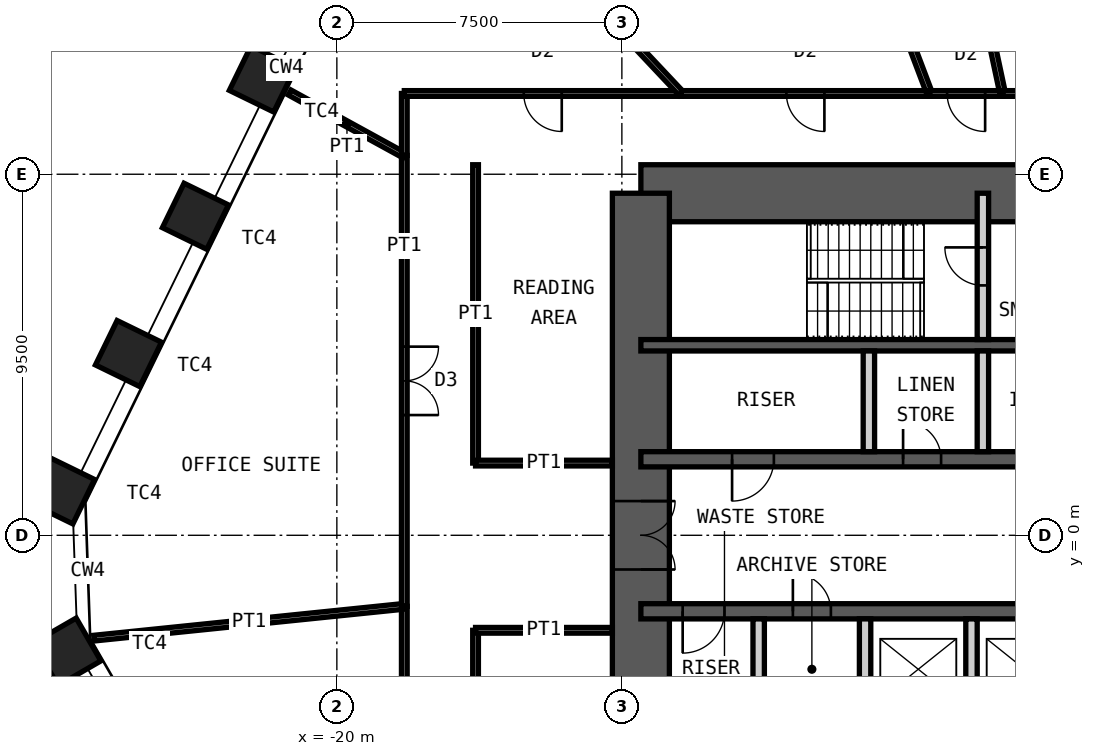
"""IFC4 building model, lengths in metres.
Left out: names, types, materials, properties, quantities, classifications, styles, units other than length and angle.
Written with IfcOpenShell. Run it as: python <this file> out.ifc"""

import sys

from ifc_helpers import new_model, si_unit, direction, frame, frame_2d, origin, origin_2d, place, context, subcontext, project, spatial, rectangle, hollow_rectangle, extrude, element, fill, save


model = new_model("IFC4")
c1 = context("Model", 3, precision=1e-05, world=origin(), true_north=direction((0.0, 1.0)))
c2 = subcontext(c1, "Body", "Model", "MODEL_VIEW")
j1 = project(units=[si_unit("LENGTHUNIT", "METRE"), si_unit("PLANEANGLEUNIT", "RADIAN")], contexts=[c1])
p1 = place(None, origin())
s1 = spatial("IfcSite", under=j1, at=p1, CompositionType="ELEMENT")
p2 = place(p1, origin())
s2 = spatial("IfcBuilding", under=s1, at=p2, CompositionType="ELEMENT")
p3 = place(p2, frame((0.0, 0.0, 145.0)))
s3 = spatial("IfcBuildingStorey", under=s2, at=p3, CompositionType="ELEMENT", Elevation=145.0)
for number, where, z_axis, x_axis in (
    (1, (-27.097, -3.067, 0.0), (0.0, 0.0, 1.0), (0.5, -0.866, 0.0)),
    (2, (-27.245, 1.169, 0.0), (0.0, 0.0, 1.0), (-0.438, -0.899, 0.0)),
    (3, (-25.483, 4.781, 0.0), (0.0, 0.0, 1.0), (-0.438, -0.899, 0.0)),
    (4, (-23.721, 8.394, 0.0), (0.0, 0.0, 1.0), (-0.438, -0.899, 0.0)),
    (5, (-21.959, 12.006, 0.0), (0.0, 0.0, 1.0), (-0.438, -0.899, 0.0)),
):
    element("IfcColumn", number, at=place(p3, frame(where, z_axis=z_axis, x_axis=x_axis)), inside=s3, PredefinedType="COLUMN", context=c2, shape_type="SweptSolid", body=[
        extrude(hollow_rectangle(XDim=1.3, YDim=1.3, WallThickness=0.1, at=origin_2d()), origin(), (0.0, 0.0, 1.0), 4.2),
    ])
p4 = place(p3, frame((-12.0, 9.0, 0.0), z_axis=(0.0, 0.0, 1.0), x_axis=(1.0, 0.0, 0.0)))
e6 = element("IfcWall", 6, at=p4, inside=s3, PredefinedType="SHEAR", context=c2, shape_type="SweptSolid", body=[
    extrude(rectangle(XDim=24.0, YDim=1.5, at=frame_2d((12.0, 0.0))), origin(), (0.0, 0.0, 1.0), 4.2),
])
p5 = place(p4, frame((10.4, 0.0, 0.0)))
e7 = element("IfcOpeningElement", 7, at=p5, cuts=e6, PredefinedType="OPENING", context=c2, shape_type="SweptSolid", body=[
    extrude(rectangle(XDim=1.0, YDim=2.1, at=frame_2d((0.5, 1.05))), frame((0.0, 0.76, 0.0), z_axis=(0.0, -1.0, 0.0), x_axis=(1.0, 0.0, 0.0)), (0.0, 0.0, 1.0), 1.52),
])
p6 = place(p4, frame((17.6, 0.0, 0.0)))
e8 = element("IfcOpeningElement", 8, at=p6, cuts=e6, PredefinedType="OPENING", context=c2, shape_type="SweptSolid", body=[
    extrude(rectangle(XDim=0.9, YDim=2.1, at=frame_2d((0.45, 1.05))), frame((0.0, 0.76, 0.0), z_axis=(0.0, -1.0, 0.0), x_axis=(1.0, 0.0, 0.0)), (0.0, 0.0, 1.0), 1.52),
])
p7 = place(p4, frame((21.9, 0.0, 0.0)))
e9 = element("IfcOpeningElement", 9, at=p7, cuts=e6, PredefinedType="OPENING", context=c2, shape_type="SweptSolid", body=[
    extrude(rectangle(XDim=0.9, YDim=2.1, at=frame_2d((0.45, 1.05))), frame((0.0, 0.76, 0.0), z_axis=(0.0, -1.0, 0.0), x_axis=(1.0, 0.0, 0.0)), (0.0, 0.0, 1.0), 1.52),
])
p8 = place(p3, frame((-12.0, -9.0, 0.0), z_axis=(0.0, 0.0, 1.0), x_axis=(0.0, 1.0, 0.0)))
e10 = element("IfcWall", 10, at=p8, inside=s3, PredefinedType="SHEAR", context=c2, shape_type="SweptSolid", body=[
    extrude(rectangle(XDim=18.0, YDim=1.5, at=frame_2d((9.0, 0.0))), origin(), (0.0, 0.0, 1.0), 4.2),
])
p9 = place(p8, frame((8.1, 0.0, 0.0)))
e11 = element("IfcOpeningElement", 11, at=p9, cuts=e10, PredefinedType="OPENING", context=c2, shape_type="SweptSolid", body=[
    extrude(rectangle(XDim=1.8, YDim=2.1, at=frame_2d((0.9, 1.05))), frame((0.0, 0.76, 0.0), z_axis=(0.0, -1.0, 0.0), x_axis=(1.0, 0.0, 0.0)), (0.0, 0.0, 1.0), 1.52),
])
p10 = place(p3, frame((-12.0, 5.0, 0.0), z_axis=(0.0, 0.0, 1.0), x_axis=(1.0, 0.0, 0.0)))
e12 = element("IfcWall", 12, at=p10, inside=s3, PredefinedType="SHEAR", context=c2, shape_type="SweptSolid", body=[
    extrude(rectangle(XDim=24.0, YDim=0.3, at=frame_2d((12.0, 0.0))), origin(), (0.0, 0.0, 1.0), 4.2),
])
p11 = place(p3, frame((-12.0, 2.0, 0.0), z_axis=(0.0, 0.0, 1.0), x_axis=(1.0, 0.0, 0.0)))
e13 = element("IfcWall", 13, at=p11, inside=s3, PredefinedType="SHEAR", context=c2, shape_type="SweptSolid", body=[
    extrude(rectangle(XDim=24.0, YDim=0.4, at=frame_2d((12.0, 0.0))), origin(), (0.0, 0.0, 1.0), 4.2),
])
p12 = place(p11, frame((2.4, 0.0, 0.0)))
e14 = element("IfcOpeningElement", 14, at=p12, cuts=e13, PredefinedType="OPENING", context=c2, shape_type="SweptSolid", body=[
    extrude(rectangle(XDim=1.1, YDim=2.1, at=frame_2d((0.55, 1.05))), frame((0.0, 0.21, 0.0), z_axis=(0.0, -1.0, 0.0), x_axis=(1.0, 0.0, 0.0)), (0.0, 0.0, 1.0), 0.42),
])
p13 = place(p11, frame((22.0, 0.0, 0.0)))
e15 = element("IfcOpeningElement", 15, at=p13, cuts=e13, PredefinedType="OPENING", context=c2, shape_type="SweptSolid", body=[
    extrude(rectangle(XDim=1.1, YDim=2.1, at=frame_2d((0.55, 1.05))), frame((0.0, 0.21, 0.0), z_axis=(0.0, -1.0, 0.0), x_axis=(1.0, 0.0, 0.0)), (0.0, 0.0, 1.0), 0.42),
])
p14 = place(p11, frame((10.15, 0.0, 0.0)))
e16 = element("IfcOpeningElement", 16, at=p14, cuts=e13, PredefinedType="OPENING", context=c2, shape_type="SweptSolid", body=[
    extrude(rectangle(XDim=1.0, YDim=2.1, at=frame_2d((0.5, 1.05))), frame((0.0, 0.21, 0.0), z_axis=(0.0, -1.0, 0.0), x_axis=(1.0, 0.0, 0.0)), (0.0, 0.0, 1.0), 0.42),
])
p15 = place(p11, frame((6.9, 0.0, 0.0)))
e17 = element("IfcOpeningElement", 17, at=p15, cuts=e13, PredefinedType="OPENING", context=c2, shape_type="SweptSolid", body=[
    extrude(rectangle(XDim=1.0, YDim=2.1, at=frame_2d((0.5, 1.05))), frame((0.0, 0.21, 0.0), z_axis=(0.0, -1.0, 0.0), x_axis=(1.0, 0.0, 0.0)), (0.0, 0.0, 1.0), 0.42),
])
p16 = place(p11, frame((13.35, 0.0, 0.0)))
e18 = element("IfcOpeningElement", 18, at=p16, cuts=e13, PredefinedType="OPENING", context=c2, shape_type="SweptSolid", body=[
    extrude(rectangle(XDim=1.1, YDim=2.4, at=frame_2d((0.55, 1.2))), frame((0.0, 0.21, 0.0), z_axis=(0.0, -1.0, 0.0), x_axis=(1.0, 0.0, 0.0)), (0.0, 0.0, 1.0), 0.42),
])
p17 = place(p11, frame((16.15, 0.0, 0.0)))
e19 = element("IfcOpeningElement", 19, at=p17, cuts=e13, PredefinedType="OPENING", context=c2, shape_type="SweptSolid", body=[
    extrude(rectangle(XDim=1.1, YDim=2.4, at=frame_2d((0.55, 1.2))), frame((0.0, 0.21, 0.0), z_axis=(0.0, -1.0, 0.0), x_axis=(1.0, 0.0, 0.0)), (0.0, 0.0, 1.0), 0.42),
])
p18 = place(p11, frame((18.95, 0.0, 0.0)))
e20 = element("IfcOpeningElement", 20, at=p18, cuts=e13, PredefinedType="OPENING", context=c2, shape_type="SweptSolid", body=[
    extrude(rectangle(XDim=1.1, YDim=2.4, at=frame_2d((0.55, 1.2))), frame((0.0, 0.21, 0.0), z_axis=(0.0, -1.0, 0.0), x_axis=(1.0, 0.0, 0.0)), (0.0, 0.0, 1.0), 0.42),
])
p19 = place(p3, frame((-12.0, -2.0, 0.0), z_axis=(0.0, 0.0, 1.0), x_axis=(1.0, 0.0, 0.0)))
e21 = element("IfcWall", 21, at=p19, inside=s3, PredefinedType="SHEAR", context=c2, shape_type="SweptSolid", body=[
    extrude(rectangle(XDim=24.0, YDim=0.4, at=frame_2d((12.0, 0.0))), origin(), (0.0, 0.0, 1.0), 4.2),
])
p20 = place(p19, frame((1.1, 0.0, 0.0)))
e22 = element("IfcOpeningElement", 22, at=p20, cuts=e21, PredefinedType="OPENING", context=c2, shape_type="SweptSolid", body=[
    extrude(rectangle(XDim=1.1, YDim=2.1, at=frame_2d((0.55, 1.05))), frame((0.0, 0.21, 0.0), z_axis=(0.0, -1.0, 0.0), x_axis=(1.0, 0.0, 0.0)), (0.0, 0.0, 1.0), 0.42),
])
p21 = place(p19, frame((13.55, 0.0, 0.0)))
e23 = element("IfcOpeningElement", 23, at=p21, cuts=e21, PredefinedType="OPENING", context=c2, shape_type="SweptSolid", body=[
    extrude(rectangle(XDim=1.1, YDim=2.1, at=frame_2d((0.55, 1.05))), frame((0.0, 0.21, 0.0), z_axis=(0.0, -1.0, 0.0), x_axis=(1.0, 0.0, 0.0)), (0.0, 0.0, 1.0), 0.42),
])
p22 = place(p19, frame((20.7, 0.0, 0.0)))
e24 = element("IfcOpeningElement", 24, at=p22, cuts=e21, PredefinedType="OPENING", context=c2, shape_type="SweptSolid", body=[
    extrude(rectangle(XDim=1.1, YDim=2.1, at=frame_2d((0.55, 1.05))), frame((0.0, 0.21, 0.0), z_axis=(0.0, -1.0, 0.0), x_axis=(1.0, 0.0, 0.0)), (0.0, 0.0, 1.0), 0.42),
])
p23 = place(p19, frame((4.0, 0.0, 0.0)))
e25 = element("IfcOpeningElement", 25, at=p23, cuts=e21, PredefinedType="OPENING", context=c2, shape_type="SweptSolid", body=[
    extrude(rectangle(XDim=1.0, YDim=2.1, at=frame_2d((0.5, 1.05))), frame((0.0, 0.21, 0.0), z_axis=(0.0, -1.0, 0.0), x_axis=(1.0, 0.0, 0.0)), (0.0, 0.0, 1.0), 0.42),
])
p24 = place(p3, frame((-3.0, 5.15, 0.0), z_axis=(0.0, 0.0, 1.0), x_axis=(0.0, 1.0, 0.0)))
e26 = element("IfcWall", 26, at=p24, inside=s3, PredefinedType="PARTITIONING", context=c2, shape_type="SweptSolid", body=[
    extrude(rectangle(XDim=3.85, YDim=0.3, at=frame_2d((1.925, 0.0))), origin(), (0.0, 0.0, 1.0), 3.98),
])
p25 = place(p24, frame((1.425, 0.0, 0.0)))
e27 = element("IfcOpeningElement", 27, at=p25, cuts=e26, PredefinedType="OPENING", context=c2, shape_type="SweptSolid", body=[
    extrude(rectangle(XDim=1.0, YDim=2.1, at=frame_2d((0.5, 1.05))), frame((0.0, 0.16, 0.0), z_axis=(0.0, -1.0, 0.0), x_axis=(1.0, 0.0, 0.0)), (0.0, 0.0, 1.0), 0.32),
])
for number, where, z_axis, x_axis in (
    (28, (-6.0, 2.2, 0.0), (0.0, 0.0, 1.0), (0.0, 1.0, 0.0)),
    (29, (-3.0, 2.2, 0.0), (0.0, 0.0, 1.0), (0.0, 1.0, 0.0)),
    (30, (-8.9, -4.85, 0.0), (0.0, 0.0, 1.0), (0.0, 1.0, 0.0)),
    (31, (-6.1, -4.85, 0.0), (0.0, 0.0, 1.0), (0.0, 1.0, 0.0)),
    (32, (-3.3, -4.85, 0.0), (0.0, 0.0, 1.0), (0.0, 1.0, 0.0)),
):
    element("IfcWall", number, at=place(p3, frame(where, z_axis=z_axis, x_axis=x_axis)), inside=s3, PredefinedType="PARTITIONING", context=c2, shape_type="SweptSolid", body=[
        extrude(rectangle(XDim=2.65, YDim=0.3, at=frame_2d((1.325, 0.0))), origin(), (0.0, 0.0, 1.0), 3.98),
    ])
p26 = place(p3, frame((-18.225, -11.625, 0.0), z_axis=(0.0, 0.0, 1.0), x_axis=(0.0, 1.0, 0.0)))
e33 = element("IfcWall", 33, at=p26, inside=s3, PredefinedType="PARTITIONING", context=c2, shape_type="SweptSolid", body=[
    extrude(rectangle(XDim=9.756, YDim=0.15, at=frame_2d((4.878, 0.0))), origin(), (0.0, 0.0, 1.0), 4.03),
])
p27 = place(p26, frame((3.978, 0.0, 0.0)))
e34 = element("IfcOpeningElement", 34, at=p27, cuts=e33, PredefinedType="OPENING", context=c2, shape_type="SweptSolid", body=[
    extrude(rectangle(XDim=1.8, YDim=2.4, at=frame_2d((0.9, 1.2))), frame((0.0, 0.085, 0.0), z_axis=(0.0, -1.0, 0.0), x_axis=(1.0, 0.0, 0.0)), (0.0, 0.0, 1.0), 0.17),
])
p28 = place(p3, frame((-26.391, -2.706, 0.0), z_axis=(0.0, 0.0, 1.0), x_axis=(0.994783450774, 0.102009245004, 0.0)))
e35 = element("IfcWall", 35, at=p28, inside=s3, PredefinedType="PARTITIONING", context=c2, shape_type="SweptSolid", body=[
    extrude(rectangle(XDim=8.209, YDim=0.15, at=frame_2d((4.104, 0.0))), origin(), (0.0, 0.0, 1.0), 2.93),
])
p29 = place(p3, frame((-18.225, -1.869, 0.0), z_axis=(0.0, 0.0, 1.0), x_axis=(0.0, 1.0, 0.0)))
e36 = element("IfcWall", 36, at=p29, inside=s3, PredefinedType="PARTITIONING", context=c2, shape_type="SweptSolid", body=[
    extrude(rectangle(XDim=11.865, YDim=0.15, at=frame_2d((5.932, 0.0))), origin(), (0.0, 0.0, 1.0), 4.03),
])
p30 = place(p29, frame((5.032, 0.0, 0.0)))
e37 = element("IfcOpeningElement", 37, at=p30, cuts=e36, PredefinedType="OPENING", context=c2, shape_type="SweptSolid", body=[
    extrude(rectangle(XDim=1.8, YDim=2.4, at=frame_2d((0.9, 1.2))), frame((0.0, 0.085, 0.0), z_axis=(0.0, -1.0, 0.0), x_axis=(1.0, 0.0, 0.0)), (0.0, 0.0, 1.0), 0.17),
])
p31 = place(p3, frame((-21.242, 11.651, 0.0), z_axis=(0.0, 0.0, 1.0), x_axis=(0.876768023831, -0.480913539409, 0.0)))
e38 = element("IfcWall", 38, at=p31, inside=s3, PredefinedType="PARTITIONING", context=c2, shape_type="SweptSolid", body=[
    extrude(rectangle(XDim=3.441, YDim=0.15, at=frame_2d((1.721, 0.0))), origin(), (0.0, 0.0, 1.0), 3.33),
])
p32 = place(p3, frame((-18.225, 9.996, 0.0), z_axis=(0.0, 0.0, 1.0), x_axis=(0.0, 1.0, 0.0)))
e39 = element("IfcWall", 39, at=p32, inside=s3, PredefinedType="PARTITIONING", context=c2, shape_type="SweptSolid", body=[
    extrude(rectangle(XDim=1.629, YDim=0.15, at=frame_2d((0.814, 0.0))), origin(), (0.0, 0.0, 1.0), 4.03),
])
p33 = place(p3, frame((-18.225, 11.625, 0.0), z_axis=(0.0, 0.0, 1.0), x_axis=(1.0, 0.0, 0.0)))
e40 = element("IfcWall", 40, at=p33, inside=s3, PredefinedType="PARTITIONING", context=c2, shape_type="SweptSolid", body=[
    extrude(rectangle(XDim=7.286, YDim=0.15, at=frame_2d((3.643, 0.0))), origin(), (0.0, 0.0, 1.0), 4.03),
])
p34 = place(p33, frame((3.143, 0.0, 0.0)))
e41 = element("IfcOpeningElement", 41, at=p34, cuts=e40, PredefinedType="OPENING", context=c2, shape_type="SweptSolid", body=[
    extrude(rectangle(XDim=1.0, YDim=2.4, at=frame_2d((0.5, 1.2))), frame((0.0, 0.085, 0.0), z_axis=(0.0, -1.0, 0.0), x_axis=(1.0, 0.0, 0.0)), (0.0, 0.0, 1.0), 0.17),
])
p35 = place(p3, frame((-17.738, 18.851, 0.0), z_axis=(0.0, 0.0, 1.0), x_axis=(0.685286406267, -0.728273672039, 0.0)))
e42 = element("IfcWall", 42, at=p35, inside=s3, PredefinedType="PARTITIONING", context=c2, shape_type="SweptSolid", body=[
    extrude(rectangle(XDim=9.922, YDim=0.15, at=frame_2d((4.961, 0.0))), origin(), (0.0, 0.0, 1.0), 3.33),
])
p36 = place(p3, frame((-10.939, 11.625, 0.0), z_axis=(0.0, 0.0, 1.0), x_axis=(1.0, 0.0, 0.0)))
e43 = element("IfcWall", 43, at=p36, inside=s3, PredefinedType="PARTITIONING", context=c2, shape_type="SweptSolid", body=[
    extrude(rectangle(XDim=6.536, YDim=0.15, at=frame_2d((3.268, 0.0))), origin(), (0.0, 0.0, 1.0), 4.03),
])
p37 = place(p36, frame((2.768, 0.0, 0.0)))
e44 = element("IfcOpeningElement", 44, at=p37, cuts=e43, PredefinedType="OPENING", context=c2, shape_type="SweptSolid", body=[
    extrude(rectangle(XDim=1.0, YDim=2.4, at=frame_2d((0.5, 1.2))), frame((0.0, 0.085, 0.0), z_axis=(0.0, -1.0, 0.0), x_axis=(1.0, 0.0, 0.0)), (0.0, 0.0, 1.0), 0.17),
])
p38 = place(p3, frame((-9.167, 24.207, 0.0), z_axis=(0.0, 0.0, 1.0), x_axis=(0.354156368181, -0.935186220427, 0.0)))
e45 = element("IfcWall", 45, at=p38, inside=s3, PredefinedType="PARTITIONING", context=c2, shape_type="SweptSolid", body=[
    extrude(rectangle(XDim=13.454, YDim=0.15, at=frame_2d((6.727, 0.0))), origin(), (0.0, 0.0, 1.0), 3.33),
])
p39 = place(p3, frame((-4.403, 11.625, 0.0), z_axis=(0.0, 0.0, 1.0), x_axis=(1.0, 0.0, 0.0)))
e46 = element("IfcWall", 46, at=p39, inside=s3, PredefinedType="PARTITIONING", context=c2, shape_type="SweptSolid", body=[
    extrude(rectangle(XDim=1.923, YDim=0.15, at=frame_2d((0.961, 0.0))), origin(), (0.0, 0.0, 1.0), 4.03),
])
p40 = place(p39, frame((0.461, 0.0, 0.0)))
e47 = element("IfcOpeningElement", 47, at=p40, cuts=e46, PredefinedType="OPENING", context=c2, shape_type="SweptSolid", body=[
    extrude(rectangle(XDim=1.0, YDim=2.4, at=frame_2d((0.5, 1.2))), frame((0.0, 0.085, 0.0), z_axis=(0.0, -1.0, 0.0), x_axis=(1.0, 0.0, 0.0)), (0.0, 0.0, 1.0), 0.17),
])
p41 = place(p3, frame((-5.163, 24.202, 0.0), z_axis=(0.0, 0.0, 1.0), x_axis=(0.208618861146, -0.977997019819, 0.0)))
e48 = element("IfcWall", 48, at=p41, inside=s3, PredefinedType="PARTITIONING", context=c2, shape_type="SweptSolid", body=[
    extrude(rectangle(XDim=12.86, YDim=0.15, at=frame_2d((6.43, 0.0))), origin(), (0.0, 0.0, 1.0), 3.33),
])
p42 = place(p3, frame((-2.48, 11.625, 0.0), z_axis=(0.0, 0.0, 1.0), x_axis=(1.0, 0.0, 0.0)))
e49 = element("IfcWall", 49, at=p42, inside=s3, PredefinedType="PARTITIONING", context=c2, shape_type="SweptSolid", body=[
    extrude(rectangle(XDim=1.923, YDim=0.15, at=frame_2d((0.961, 0.0))), origin(), (0.0, 0.0, 1.0), 4.03),
])
p43 = place(p42, frame((0.461, 0.0, 0.0)))
e50 = element("IfcOpeningElement", 50, at=p43, cuts=e49, PredefinedType="OPENING", context=c2, shape_type="SweptSolid", body=[
    extrude(rectangle(XDim=1.0, YDim=2.4, at=frame_2d((0.5, 1.2))), frame((0.0, 0.085, 0.0), z_axis=(0.0, -1.0, 0.0), x_axis=(1.0, 0.0, 0.0)), (0.0, 0.0, 1.0), 0.17),
])
p44 = place(p3, frame((-16.35, 1.9, 0.0), z_axis=(0.0, 0.0, 1.0), x_axis=(0.0, 1.0, 0.0)))
e51 = element("IfcWall", 51, at=p44, inside=s3, PredefinedType="PARTITIONING", context=c2, shape_type="SweptSolid", body=[
    extrude(rectangle(XDim=7.85, YDim=0.15, at=frame_2d((3.925, 0.0))), origin(), (0.0, 0.0, 1.0), 4.03),
])
p45 = place(p3, frame((-12.75, 1.9, 0.0), z_axis=(0.0, 0.0, 1.0), x_axis=(-1.0, 0.0, 0.0)))
e52 = element("IfcWall", 52, at=p45, inside=s3, PredefinedType="PARTITIONING", context=c2, shape_type="SweptSolid", body=[
    extrude(rectangle(XDim=3.6, YDim=0.15, at=frame_2d((1.8, 0.0))), origin(), (0.0, 0.0, 1.0), 3.33),
])
p46 = place(p3, frame((-16.35, -9.75, 0.0), z_axis=(0.0, 0.0, 1.0), x_axis=(0.0, 1.0, 0.0)))
e53 = element("IfcWall", 53, at=p46, inside=s3, PredefinedType="PARTITIONING", context=c2, shape_type="SweptSolid", body=[
    extrude(rectangle(XDim=7.25, YDim=0.15, at=frame_2d((3.625, 0.0))), origin(), (0.0, 0.0, 1.0), 4.03),
])
p47 = place(p3, frame((-12.75, -2.5, 0.0), z_axis=(0.0, 0.0, 1.0), x_axis=(-1.0, 0.0, 0.0)))
e54 = element("IfcWall", 54, at=p47, inside=s3, PredefinedType="PARTITIONING", context=c2, shape_type="SweptSolid", body=[
    extrude(rectangle(XDim=3.6, YDim=0.15, at=frame_2d((1.8, 0.0))), origin(), (0.0, 0.0, 1.0), 3.33),
])
p48 = place(p25, origin())
e55 = element("IfcDoor", 55, at=p48, inside=s3, OperationType="SINGLE_SWING_LEFT", PredefinedType="DOOR", context=c2, shape_type="SweptSolid", body=[
    extrude(rectangle(XDim=1.0, YDim=2.1, at=frame_2d((0.5, 1.05))), frame((0.0, 0.025, 0.0), z_axis=(0.0, -1.0, 0.0), x_axis=(1.0, 0.0, 0.0)), (0.0, 0.0, 1.0), 0.05),
])
fill(e27, e55)
p49 = place(p12, origin())
e56 = element("IfcDoor", 56, at=p49, inside=s3, OperationType="SINGLE_SWING_LEFT", PredefinedType="DOOR", context=c2, shape_type="SweptSolid", body=[
    extrude(rectangle(XDim=1.1, YDim=2.1, at=frame_2d((0.55, 1.05))), frame((0.0, 0.025, 0.0), z_axis=(0.0, -1.0, 0.0), x_axis=(1.0, 0.0, 0.0)), (0.0, 0.0, 1.0), 0.05),
])
fill(e14, e56)
p50 = place(p20, origin())
e57 = element("IfcDoor", 57, at=p50, inside=s3, OperationType="SINGLE_SWING_LEFT", PredefinedType="DOOR", context=c2, shape_type="SweptSolid", body=[
    extrude(rectangle(XDim=1.1, YDim=2.1, at=frame_2d((0.55, 1.05))), frame((0.0, 0.025, 0.0), z_axis=(0.0, -1.0, 0.0), x_axis=(1.0, 0.0, 0.0)), (0.0, 0.0, 1.0), 0.05),
])
fill(e22, e57)
p51 = place(p9, origin())
e58 = element("IfcDoor", 58, at=p51, inside=s3, OperationType="DOUBLE_DOOR_DOUBLE_SWING", PredefinedType="DOOR", context=c2, shape_type="SweptSolid", body=[
    extrude(rectangle(XDim=1.8, YDim=2.1, at=frame_2d((0.9, 1.05))), frame((0.0, 0.025, 0.0), z_axis=(0.0, -1.0, 0.0), x_axis=(1.0, 0.0, 0.0)), (0.0, 0.0, 1.0), 0.05),
])
fill(e11, e58)
p52 = place(p15, origin())
e59 = element("IfcDoor", 59, at=p52, inside=s3, OperationType="SINGLE_SWING_RIGHT", PredefinedType="DOOR", context=c2, shape_type="SweptSolid", body=[
    extrude(rectangle(XDim=1.0, YDim=2.1, at=frame_2d((0.5, 1.05))), frame((0.0, 0.025, 0.0), z_axis=(0.0, -1.0, 0.0), x_axis=(1.0, 0.0, 0.0)), (0.0, 0.0, 1.0), 0.05),
])
fill(e17, e59)
p53 = place(p23, origin())
e60 = element("IfcDoor", 60, at=p53, inside=s3, OperationType="SINGLE_SWING_RIGHT", PredefinedType="DOOR", context=c2, shape_type="SweptSolid", body=[
    extrude(rectangle(XDim=1.0, YDim=2.1, at=frame_2d((0.5, 1.05))), frame((0.0, 0.025, 0.0), z_axis=(0.0, -1.0, 0.0), x_axis=(1.0, 0.0, 0.0)), (0.0, 0.0, 1.0), 0.05),
])
fill(e25, e60)
p54 = place(p30, origin())
e61 = element("IfcDoor", 61, at=p54, inside=s3, OperationType="DOUBLE_DOOR_DOUBLE_SWING", PredefinedType="DOOR", context=c2, shape_type="SweptSolid", body=[
    extrude(rectangle(XDim=1.8, YDim=2.4, at=frame_2d((0.9, 1.2))), frame((0.0, 0.025, 0.0), z_axis=(0.0, -1.0, 0.0), x_axis=(1.0, 0.0, 0.0)), (0.0, 0.0, 1.0), 0.05),
])
fill(e37, e61)
p55 = place(p34, origin())
e62 = element("IfcDoor", 62, at=p55, inside=s3, OperationType="SINGLE_SWING_RIGHT", PredefinedType="DOOR", context=c2, shape_type="SweptSolid", body=[
    extrude(rectangle(XDim=1.0, YDim=2.4, at=frame_2d((0.5, 1.2))), frame((0.0, 0.025, 0.0), z_axis=(0.0, -1.0, 0.0), x_axis=(1.0, 0.0, 0.0)), (0.0, 0.0, 1.0), 0.05),
])
fill(e41, e62)
p56 = place(p37, origin())
e63 = element("IfcDoor", 63, at=p56, inside=s3, OperationType="SINGLE_SWING_RIGHT", PredefinedType="DOOR", context=c2, shape_type="SweptSolid", body=[
    extrude(rectangle(XDim=1.0, YDim=2.4, at=frame_2d((0.5, 1.2))), frame((0.0, 0.025, 0.0), z_axis=(0.0, -1.0, 0.0), x_axis=(1.0, 0.0, 0.0)), (0.0, 0.0, 1.0), 0.05),
])
fill(e44, e63)
p57 = place(p40, origin())
e64 = element("IfcDoor", 64, at=p57, inside=s3, OperationType="SINGLE_SWING_RIGHT", PredefinedType="DOOR", context=c2, shape_type="SweptSolid", body=[
    extrude(rectangle(XDim=1.0, YDim=2.4, at=frame_2d((0.5, 1.2))), frame((0.0, 0.025, 0.0), z_axis=(0.0, -1.0, 0.0), x_axis=(1.0, 0.0, 0.0)), (0.0, 0.0, 1.0), 0.05),
])
fill(e47, e64)
save(model, sys.argv[1])
